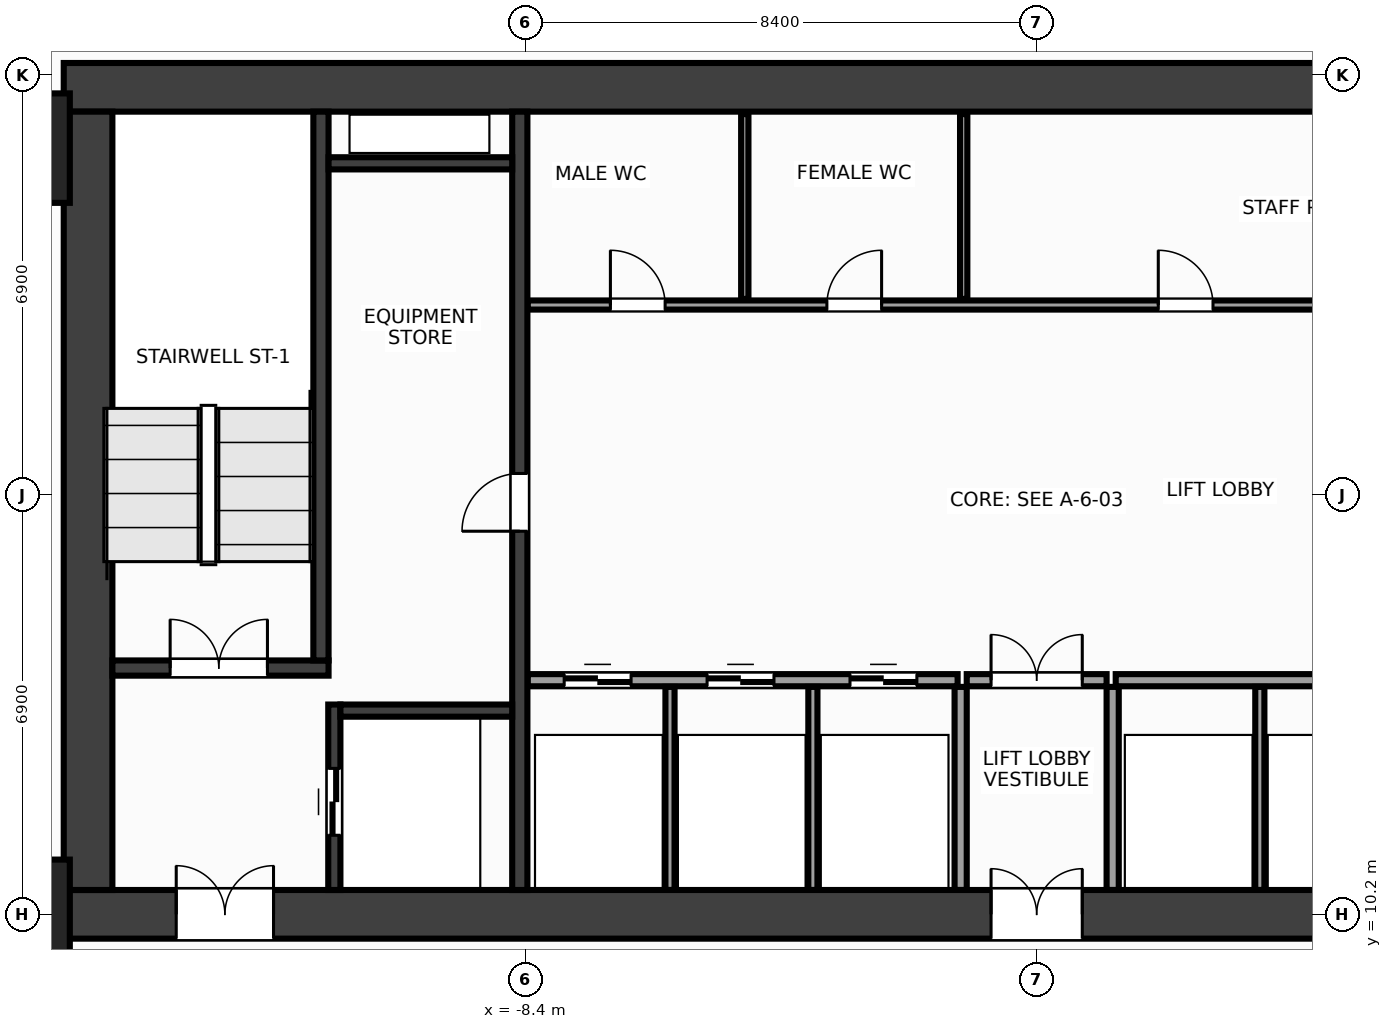
"""IFC4 building model, lengths in metres.
Left out: names, types, materials, properties, quantities, classifications, styles, units other than length and angle.
Written with IfcOpenShell. Run it as: python <this file> out.ifc"""

import sys

from ifc_helpers import new_model, si_unit, direction, frame, frame_2d, origin, origin_2d, place, context, subcontext, project, spatial, rectangle, extrude, source, transform, mapped, element, fill, save


model = new_model("IFC4")
c1 = context("Model", 3, precision=1e-05, world=origin(), true_north=direction((0.0, 1.0)))
c2 = subcontext(c1, "Body", "Model", "MODEL_VIEW")
j1 = project(units=[si_unit("LENGTHUNIT", "METRE"), si_unit("PLANEANGLEUNIT", "RADIAN")], contexts=[c1])
p1 = place(None, origin())
s1 = spatial("IfcSite", under=j1, at=p1, CompositionType="ELEMENT")
p2 = place(p1, origin())
s2 = spatial("IfcBuilding", under=s1, at=p2, CompositionType="ELEMENT")
p3 = place(p2, frame((0.0, 0.0, 23.6)))
s3 = spatial("IfcBuildingStorey", under=s2, at=p3, CompositionType="ELEMENT", Elevation=23.6)
m1 = source(origin(), c2, "Body", "SweptSolid", [
    extrude(rectangle(XDim=32.0, YDim=0.8, at=frame_2d((16.0, 0.0))), origin(), (0.0, 0.0, 1.0), 3.6),
])
p4 = place(p3, frame((-16.0, 23.8, 0.0), z_axis=(0.0, 0.0, 1.0), x_axis=(1.0, 0.0, 0.0)))
e1 = element("IfcWall", 1, at=p4, inside=s3, PredefinedType="SHEAR", context=c2, shape_type="MappedRepresentation", body=[
    mapped(m1, transform((0.0, 0.0, 0.0), x_axis=(1.0, 0.0, 0.0), y_axis=(0.0, 1.0, 0.0), z_axis=(0.0, 0.0, 1.0), scale=1.0)),
])
p5 = place(p3, frame((-16.0, 10.2, 0.0), z_axis=(0.0, 0.0, 1.0), x_axis=(1.0, 0.0, 0.0)))
e2 = element("IfcWall", 2, at=p5, inside=s3, PredefinedType="SHEAR", context=c2, shape_type="MappedRepresentation", body=[
    mapped(m1, transform((0.0, 0.0, 0.0), x_axis=(1.0, 0.0, 0.0), y_axis=(0.0, 1.0, 0.0), z_axis=(0.0, 0.0, 1.0), scale=1.0)),
])
p6 = place(p5, frame((1.85, 0.0, 0.0)))
e3 = element("IfcOpeningElement", 3, at=p6, cuts=e2, PredefinedType="OPENING", context=c2, shape_type="SweptSolid", body=[
    extrude(rectangle(XDim=1.6, YDim=2.15, at=frame_2d((0.8, 1.075))), frame((0.0, 0.412, 0.0), z_axis=(0.0, -1.0, 0.0), x_axis=(1.0, 0.0, 0.0)), (0.0, 0.0, 1.0), 0.824),
])
p7 = place(p5, frame((28.55, 0.0, 0.0)))
e4 = element("IfcOpeningElement", 4, at=p7, cuts=e2, PredefinedType="OPENING", context=c2, shape_type="SweptSolid", body=[
    extrude(rectangle(XDim=1.6, YDim=2.15, at=frame_2d((0.8, 1.075))), frame((0.0, 0.412, 0.0), z_axis=(0.0, -1.0, 0.0), x_axis=(1.0, 0.0, 0.0)), (0.0, 0.0, 1.0), 0.824),
])
p8 = place(p5, frame((15.25, 0.0, 0.0)))
e5 = element("IfcOpeningElement", 5, at=p8, cuts=e2, PredefinedType="OPENING", context=c2, shape_type="SweptSolid", body=[
    extrude(rectangle(XDim=1.5, YDim=2.2, at=frame_2d((0.75, 1.1))), frame((0.0, 0.412, 0.0), z_axis=(0.0, -1.0, 0.0), x_axis=(1.0, 0.0, 0.0)), (0.0, 0.0, 1.0), 0.824),
])
m2 = source(origin(), c2, "Body", "SweptSolid", [
    extrude(rectangle(XDim=12.8, YDim=0.8, at=frame_2d((6.4, 0.0))), origin(), (0.0, 0.0, 1.0), 3.6),
])
p9 = place(p3, frame((-15.6, 10.6, 0.0), z_axis=(0.0, 0.0, 1.0), x_axis=(0.0, 1.0, 0.0)))
e6 = element("IfcWall", 6, at=p9, inside=s3, PredefinedType="SHEAR", context=c2, shape_type="MappedRepresentation", body=[
    mapped(m2, transform((0.0, 0.0, 0.0), x_axis=(1.0, 0.0, 0.0), y_axis=(0.0, 1.0, 0.0), z_axis=(0.0, 0.0, 1.0), scale=1.0)),
])
m3 = source(origin(), c2, "Body", "SweptSolid", [
    extrude(rectangle(XDim=12.8, YDim=0.25, at=frame_2d((6.4, 0.0))), origin(), (0.0, 0.0, 1.0), 3.6),
])
p10 = place(p3, frame((-8.5, 10.6, 0.0), z_axis=(0.0, 0.0, 1.0), x_axis=(0.0, 1.0, 0.0)))
e7 = element("IfcWall", 7, at=p10, inside=s3, PredefinedType="SHEAR", context=c2, shape_type="MappedRepresentation", body=[
    mapped(m3, transform((0.0, 0.0, 0.0), x_axis=(1.0, 0.0, 0.0), y_axis=(0.0, 1.0, 0.0), z_axis=(0.0, 0.0, 1.0), scale=1.0)),
])
p11 = place(p10, frame((5.9, 0.0, 0.0)))
e8 = element("IfcOpeningElement", 8, at=p11, cuts=e7, PredefinedType="OPENING", context=c2, shape_type="SweptSolid", body=[
    extrude(rectangle(XDim=0.95, YDim=2.15, at=frame_2d((0.475, 1.075))), frame((0.0, 0.137, 0.0), z_axis=(0.0, -1.0, 0.0), x_axis=(1.0, 0.0, 0.0)), (0.0, 0.0, 1.0), 0.274),
])
m4 = source(origin(), c2, "Body", "SweptSolid", [
    extrude(rectangle(XDim=3.555, YDim=0.25, at=frame_2d((1.777, 0.0))), origin(), (0.0, 0.0, 1.0), 3.6),
])
p12 = place(p3, frame((-15.2, 14.25, 0.0), z_axis=(0.0, 0.0, 1.0), x_axis=(1.0, 0.0, 0.0)))
e9 = element("IfcWall", 9, at=p12, inside=s3, PredefinedType="SHEAR", context=c2, shape_type="MappedRepresentation", body=[
    mapped(m4, transform((0.0, 0.0, 0.0), x_axis=(1.0, 0.0, 0.0), y_axis=(0.0, 1.0, 0.0), z_axis=(0.0, 0.0, 1.0), scale=1.0)),
])
p13 = place(p12, frame((0.95, 0.0, 0.0)))
e10 = element("IfcOpeningElement", 10, at=p13, cuts=e9, PredefinedType="OPENING", context=c2, shape_type="SweptSolid", body=[
    extrude(rectangle(XDim=1.6, YDim=2.15, at=frame_2d((0.8, 1.075))), frame((0.0, 0.137, 0.0), z_axis=(0.0, -1.0, 0.0), x_axis=(1.0, 0.0, 0.0)), (0.0, 0.0, 1.0), 0.274),
])
m5 = source(origin(), c2, "Body", "SweptSolid", [
    extrude(rectangle(XDim=9.025, YDim=0.25, at=frame_2d((4.512, 0.0))), origin(), (0.0, 0.0, 1.0), 3.6),
])
p14 = place(p3, frame((-11.77, 14.375, 0.0), z_axis=(0.0, 0.0, 1.0), x_axis=(0.0, 1.0, 0.0)))
e11 = element("IfcWall", 11, at=p14, inside=s3, PredefinedType="SHEAR", context=c2, shape_type="MappedRepresentation", body=[
    mapped(m5, transform((0.0, 0.0, 0.0), x_axis=(1.0, 0.0, 0.0), y_axis=(0.0, 1.0, 0.0), z_axis=(0.0, 0.0, 1.0), scale=1.0)),
])
m6 = source(origin(), c2, "Body", "SweptSolid", [
    extrude(rectangle(XDim=3.05, YDim=0.2, at=frame_2d((1.525, 0.0))), origin(), (0.0, 0.0, 1.0), 3.6),
])
p15 = place(p3, frame((-11.55, 10.6, 0.0), z_axis=(0.0, 0.0, 1.0), x_axis=(0.0, 1.0, 0.0)))
e12 = element("IfcWall", 12, at=p15, inside=s3, PredefinedType="SHEAR", context=c2, shape_type="MappedRepresentation", body=[
    mapped(m6, transform((0.0, 0.0, 0.0), x_axis=(1.0, 0.0, 0.0), y_axis=(0.0, 1.0, 0.0), z_axis=(0.0, 0.0, 1.0), scale=1.0)),
])
p16 = place(p15, frame((0.9, 0.0, 0.0)))
e13 = element("IfcOpeningElement", 13, at=p16, cuts=e12, PredefinedType="OPENING", context=c2, shape_type="SweptSolid", body=[
    extrude(rectangle(XDim=1.1, YDim=2.15, at=frame_2d((0.55, 1.075))), frame((0.0, 0.112, 0.0), z_axis=(0.0, -1.0, 0.0), x_axis=(1.0, 0.0, 0.0)), (0.0, 0.0, 1.0), 0.224),
])
m7 = source(origin(), c2, "Body", "SweptSolid", [
    extrude(rectangle(XDim=2.825, YDim=0.2, at=frame_2d((1.413, 0.0))), origin(), (0.0, 0.0, 1.0), 3.6),
])
p17 = place(p3, frame((-11.45, 13.55, 0.0), z_axis=(0.0, 0.0, 1.0), x_axis=(1.0, 0.0, 0.0)))
e14 = element("IfcWall", 14, at=p17, inside=s3, PredefinedType="SHEAR", context=c2, shape_type="MappedRepresentation", body=[
    mapped(m7, transform((0.0, 0.0, 0.0), x_axis=(1.0, 0.0, 0.0), y_axis=(0.0, 1.0, 0.0), z_axis=(0.0, 0.0, 1.0), scale=1.0)),
])
m8 = source(origin(), c2, "Body", "SweptSolid", [
    extrude(rectangle(XDim=3.02, YDim=0.2, at=frame_2d((1.51, 0.0))), origin(), (0.0, 0.0, 1.0), 3.6),
])
p18 = place(p3, frame((-11.645, 22.55, 0.0), z_axis=(0.0, 0.0, 1.0), x_axis=(1.0, 0.0, 0.0)))
e15 = element("IfcWall", 15, at=p18, inside=s3, PredefinedType="SHEAR", context=c2, shape_type="MappedRepresentation", body=[
    mapped(m8, transform((0.0, 0.0, 0.0), x_axis=(1.0, 0.0, 0.0), y_axis=(0.0, 1.0, 0.0), z_axis=(0.0, 0.0, 1.0), scale=1.0)),
])
m9 = source(origin(), c2, "Body", "SweptSolid", [
    extrude(rectangle(XDim=1.8, YDim=1.8, at=origin_2d()), origin(), (0.0, 0.0, 1.0), 3.6),
])
for number, where, z_axis, x_axis in (
    (16, (-16.8, 10.2, 0.0), (0.0, 0.0, 1.0), (1.0, 0.0, 0.0)),
    (17, (-16.8, 22.8, 0.0), (0.0, 0.0, 1.0), (1.0, 0.0, 0.0)),
):
    element("IfcColumn", number, at=place(p3, frame(where, z_axis=z_axis, x_axis=x_axis)), inside=s3, PredefinedType="COLUMN", context=c2, shape_type="MappedRepresentation", body=[
        mapped(m9, transform((0.0, 0.0, 0.0), x_axis=(1.0, 0.0, 0.0), y_axis=(0.0, 1.0, 0.0), z_axis=(0.0, 0.0, 1.0), scale=1.0)),
    ])
m10 = source(origin(), c2, "Body", "SweptSolid", [
    extrude(rectangle(XDim=7.07, YDim=0.2, at=frame_2d((3.535, 0.0))), origin(), (0.0, 0.0, 1.0), 3.36),
])
p19 = place(p3, frame((-8.37, 14.05, 0.0), z_axis=(0.0, 0.0, 1.0), x_axis=(1.0, 0.0, 0.0)))
e18 = element("IfcWall", 18, at=p19, inside=s3, PredefinedType="PARTITIONING", context=c2, shape_type="MappedRepresentation", body=[
    mapped(m10, transform((0.0, 0.0, 0.0), x_axis=(1.0, 0.0, 0.0), y_axis=(0.0, 1.0, 0.0), z_axis=(0.0, 0.0, 1.0), scale=1.0)),
])
p20 = place(p19, frame((0.6, 0.0, 0.0)))
e19 = element("IfcOpeningElement", 19, at=p20, cuts=e18, PredefinedType="OPENING", context=c2, shape_type="SweptSolid", body=[
    extrude(rectangle(XDim=1.1, YDim=2.15, at=frame_2d((0.55, 1.075))), frame((0.0, 0.112, 0.0), z_axis=(0.0, -1.0, 0.0), x_axis=(1.0, 0.0, 0.0)), (0.0, 0.0, 1.0), 0.224),
])
p21 = place(p19, frame((2.95, 0.0, 0.0)))
e20 = element("IfcOpeningElement", 20, at=p21, cuts=e18, PredefinedType="OPENING", context=c2, shape_type="SweptSolid", body=[
    extrude(rectangle(XDim=1.1, YDim=2.15, at=frame_2d((0.55, 1.075))), frame((0.0, 0.112, 0.0), z_axis=(0.0, -1.0, 0.0), x_axis=(1.0, 0.0, 0.0)), (0.0, 0.0, 1.0), 0.224),
])
p22 = place(p19, frame((5.3, 0.0, 0.0)))
e21 = element("IfcOpeningElement", 21, at=p22, cuts=e18, PredefinedType="OPENING", context=c2, shape_type="SweptSolid", body=[
    extrude(rectangle(XDim=1.1, YDim=2.15, at=frame_2d((0.55, 1.075))), frame((0.0, 0.112, 0.0), z_axis=(0.0, -1.0, 0.0), x_axis=(1.0, 0.0, 0.0)), (0.0, 0.0, 1.0), 0.224),
])
p23 = place(p3, frame((1.3, 14.05, 0.0), z_axis=(0.0, 0.0, 1.0), x_axis=(1.0, 0.0, 0.0)))
e22 = element("IfcWall", 22, at=p23, inside=s3, PredefinedType="PARTITIONING", context=c2, shape_type="MappedRepresentation", body=[
    mapped(m10, transform((0.0, 0.0, 0.0), x_axis=(1.0, 0.0, 0.0), y_axis=(0.0, 1.0, 0.0), z_axis=(0.0, 0.0, 1.0), scale=1.0)),
])
m11 = source(origin(), c2, "Body", "SweptSolid", [
    extrude(rectangle(XDim=3.34, YDim=0.2, at=frame_2d((1.67, 0.0))), origin(), (0.0, 0.0, 1.0), 3.36),
])
for number, where, z_axis, x_axis in (
    (23, (-1.25, 10.6, 0.0), (0.0, 0.0, 1.0), (0.0, 1.0, 0.0)),
    (24, (1.25, 10.6, 0.0), (0.0, 0.0, 1.0), (0.0, 1.0, 0.0)),
):
    element("IfcWall", number, at=place(p3, frame(where, z_axis=z_axis, x_axis=x_axis)), inside=s3, PredefinedType="PARTITIONING", context=c2, shape_type="MappedRepresentation", body=[
        mapped(m11, transform((0.0, 0.0, 0.0), x_axis=(1.0, 0.0, 0.0), y_axis=(0.0, 1.0, 0.0), z_axis=(0.0, 0.0, 1.0), scale=1.0)),
    ])
m12 = source(origin(), c2, "Body", "SweptSolid", [
    extrude(rectangle(XDim=2.3, YDim=0.2, at=frame_2d((1.15, 0.0))), origin(), (0.0, 0.0, 1.0), 3.36),
])
p24 = place(p3, frame((-1.15, 14.05, 0.0), z_axis=(0.0, 0.0, 1.0), x_axis=(1.0, 0.0, 0.0)))
e25 = element("IfcWall", 25, at=p24, inside=s3, PredefinedType="PARTITIONING", context=c2, shape_type="MappedRepresentation", body=[
    mapped(m12, transform((0.0, 0.0, 0.0), x_axis=(1.0, 0.0, 0.0), y_axis=(0.0, 1.0, 0.0), z_axis=(0.0, 0.0, 1.0), scale=1.0)),
])
p25 = place(p24, frame((0.4, 0.0, 0.0)))
e26 = element("IfcOpeningElement", 26, at=p25, cuts=e25, PredefinedType="OPENING", context=c2, shape_type="SweptSolid", body=[
    extrude(rectangle(XDim=1.5, YDim=2.2, at=frame_2d((0.75, 1.1))), frame((0.0, 0.112, 0.0), z_axis=(0.0, -1.0, 0.0), x_axis=(1.0, 0.0, 0.0)), (0.0, 0.0, 1.0), 0.224),
])
m13 = source(origin(), c2, "Body", "SweptSolid", [
    extrude(rectangle(XDim=14.59, YDim=0.15, at=frame_2d((7.295, 0.0))), origin(), (0.0, 0.0, 1.0), 3.36),
])
p26 = place(p3, frame((-8.37, 20.22, 0.0), z_axis=(0.0, 0.0, 1.0), x_axis=(1.0, 0.0, 0.0)))
e27 = element("IfcWall", 27, at=p26, inside=s3, PredefinedType="PARTITIONING", context=c2, shape_type="MappedRepresentation", body=[
    mapped(m13, transform((0.0, 0.0, 0.0), x_axis=(1.0, 0.0, 0.0), y_axis=(0.0, 1.0, 0.0), z_axis=(0.0, 0.0, 1.0), scale=1.0)),
])
p27 = place(p26, frame((1.36, 0.0, 0.0)))
e28 = element("IfcOpeningElement", 28, at=p27, cuts=e27, PredefinedType="OPENING", context=c2, shape_type="SweptSolid", body=[
    extrude(rectangle(XDim=0.9, YDim=2.15, at=frame_2d((0.45, 1.075))), frame((0.0, 0.087, 0.0), z_axis=(0.0, -1.0, 0.0), x_axis=(1.0, 0.0, 0.0)), (0.0, 0.0, 1.0), 0.174),
])
p28 = place(p26, frame((4.92, 0.0, 0.0)))
e29 = element("IfcOpeningElement", 29, at=p28, cuts=e27, PredefinedType="OPENING", context=c2, shape_type="SweptSolid", body=[
    extrude(rectangle(XDim=0.9, YDim=2.15, at=frame_2d((0.45, 1.075))), frame((0.0, 0.087, 0.0), z_axis=(0.0, -1.0, 0.0), x_axis=(1.0, 0.0, 0.0)), (0.0, 0.0, 1.0), 0.174),
])
p29 = place(p26, frame((10.37, 0.0, 0.0)))
e30 = element("IfcOpeningElement", 30, at=p29, cuts=e27, PredefinedType="OPENING", context=c2, shape_type="SweptSolid", body=[
    extrude(rectangle(XDim=0.9, YDim=2.15, at=frame_2d((0.45, 1.075))), frame((0.0, 0.087, 0.0), z_axis=(0.0, -1.0, 0.0), x_axis=(1.0, 0.0, 0.0)), (0.0, 0.0, 1.0), 0.174),
])
m14 = source(origin(), c2, "Body", "SweptSolid", [
    extrude(rectangle(XDim=3.34, YDim=0.15, at=frame_2d((1.67, 0.0))), origin(), (0.0, 0.0, 1.0), 3.36),
])
for number, where, z_axis, x_axis in (
    (31, (-6.03, 10.6, 0.0), (0.0, 0.0, 1.0), (0.0, 1.0, 0.0)),
    (32, (-3.68, 10.6, 0.0), (0.0, 0.0, 1.0), (0.0, 1.0, 0.0)),
    (33, (3.67, 10.6, 0.0), (0.0, 0.0, 1.0), (0.0, 1.0, 0.0)),
):
    element("IfcWall", number, at=place(p3, frame(where, z_axis=z_axis, x_axis=x_axis)), inside=s3, PredefinedType="PARTITIONING", context=c2, shape_type="MappedRepresentation", body=[
        mapped(m14, transform((0.0, 0.0, 0.0), x_axis=(1.0, 0.0, 0.0), y_axis=(0.0, 1.0, 0.0), z_axis=(0.0, 0.0, 1.0), scale=1.0)),
    ])
m15 = source(origin(), c2, "Body", "SweptSolid", [
    extrude(rectangle(XDim=3.04, YDim=0.12, at=frame_2d((1.52, 0.0))), origin(), (0.0, 0.0, 1.0), 3.36),
])
for number, where, z_axis, x_axis in (
    (34, (-4.8, 20.32, 0.0), (0.0, 0.0, 1.0), (0.0, 1.0, 0.0)),
    (35, (-1.2, 20.32, 0.0), (0.0, 0.0, 1.0), (0.0, 1.0, 0.0)),
):
    element("IfcWall", number, at=place(p3, frame(where, z_axis=z_axis, x_axis=x_axis)), inside=s3, PredefinedType="PARTITIONING", context=c2, shape_type="MappedRepresentation", body=[
        mapped(m15, transform((0.0, 0.0, 0.0), x_axis=(1.0, 0.0, 0.0), y_axis=(0.0, 1.0, 0.0), z_axis=(0.0, 0.0, 1.0), scale=1.0)),
    ])
m16 = source(origin(), c2, "Body", "SweptSolid", [
    extrude(rectangle(XDim=1.6, YDim=2.15, at=frame_2d((0.8, 1.075))), frame((0.0, 0.025, 0.0), z_axis=(0.0, -1.0, 0.0), x_axis=(1.0, 0.0, 0.0)), (0.0, 0.0, 1.0), 0.05),
])
p30 = place(p13, origin())
e36 = element("IfcDoor", 36, at=p30, inside=s3, OperationType="DOUBLE_DOOR_SINGLE_SWING", PredefinedType="DOOR", context=c2, shape_type="MappedRepresentation", body=[
    mapped(m16, transform((0.0, 0.0, 0.0), x_axis=(1.0, 0.0, 0.0), y_axis=(0.0, 1.0, 0.0), z_axis=(0.0, 0.0, 1.0), scale=1.0)),
])
fill(e10, e36)
p31 = place(p6, origin())
e37 = element("IfcDoor", 37, at=p31, inside=s3, OperationType="DOUBLE_DOOR_SINGLE_SWING", PredefinedType="DOOR", context=c2, shape_type="MappedRepresentation", body=[
    mapped(m16, transform((0.0, 0.0, 0.0), x_axis=(1.0, 0.0, 0.0), y_axis=(0.0, 1.0, 0.0), z_axis=(0.0, 0.0, 1.0), scale=1.0)),
])
fill(e3, e37)
m17 = source(origin(), c2, "Body", "SweptSolid", [
    extrude(rectangle(XDim=1.1, YDim=2.15, at=frame_2d((0.55, 1.075))), frame((0.0, 0.025, 0.0), z_axis=(0.0, -1.0, 0.0), x_axis=(1.0, 0.0, 0.0)), (0.0, 0.0, 1.0), 0.05),
])
p32 = place(p16, origin())
e38 = element("IfcDoor", 38, at=p32, inside=s3, OperationType="DOUBLE_DOOR_SLIDING", PredefinedType="DOOR", context=c2, shape_type="MappedRepresentation", body=[
    mapped(m17, transform((0.0, 0.0, 0.0), x_axis=(1.0, 0.0, 0.0), y_axis=(0.0, 1.0, 0.0), z_axis=(0.0, 0.0, 1.0), scale=1.0)),
])
fill(e13, e38)
m18 = source(origin(), c2, "Body", "SweptSolid", [
    extrude(rectangle(XDim=0.95, YDim=2.15, at=frame_2d((0.475, 1.075))), frame((0.0, 0.025, 0.0), z_axis=(0.0, -1.0, 0.0), x_axis=(1.0, 0.0, 0.0)), (0.0, 0.0, 1.0), 0.05),
])
p33 = place(p11, origin())
e39 = element("IfcDoor", 39, at=p33, inside=s3, OperationType="SINGLE_SWING_LEFT", PredefinedType="DOOR", context=c2, shape_type="MappedRepresentation", body=[
    mapped(m18, transform((0.0, 0.0, 0.0), x_axis=(1.0, 0.0, 0.0), y_axis=(0.0, 1.0, 0.0), z_axis=(0.0, 0.0, 1.0), scale=1.0)),
])
fill(e8, e39)
p34 = place(p20, origin())
e40 = element("IfcDoor", 40, at=p34, inside=s3, OperationType="DOUBLE_DOOR_SLIDING", PredefinedType="DOOR", context=c2, shape_type="MappedRepresentation", body=[
    mapped(m17, transform((0.0, 0.0, 0.0), x_axis=(1.0, 0.0, 0.0), y_axis=(0.0, 1.0, 0.0), z_axis=(0.0, 0.0, 1.0), scale=1.0)),
])
fill(e19, e40)
p35 = place(p21, origin())
e41 = element("IfcDoor", 41, at=p35, inside=s3, OperationType="DOUBLE_DOOR_SLIDING", PredefinedType="DOOR", context=c2, shape_type="MappedRepresentation", body=[
    mapped(m17, transform((0.0, 0.0, 0.0), x_axis=(1.0, 0.0, 0.0), y_axis=(0.0, 1.0, 0.0), z_axis=(0.0, 0.0, 1.0), scale=1.0)),
])
fill(e20, e41)
p36 = place(p22, origin())
e42 = element("IfcDoor", 42, at=p36, inside=s3, OperationType="DOUBLE_DOOR_SLIDING", PredefinedType="DOOR", context=c2, shape_type="MappedRepresentation", body=[
    mapped(m17, transform((0.0, 0.0, 0.0), x_axis=(1.0, 0.0, 0.0), y_axis=(0.0, 1.0, 0.0), z_axis=(0.0, 0.0, 1.0), scale=1.0)),
])
fill(e21, e42)
m19 = source(origin(), c2, "Body", "SweptSolid", [
    extrude(rectangle(XDim=1.5, YDim=2.2, at=frame_2d((0.75, 1.1))), frame((0.0, 0.025, 0.0), z_axis=(0.0, -1.0, 0.0), x_axis=(1.0, 0.0, 0.0)), (0.0, 0.0, 1.0), 0.05),
])
p37 = place(p25, origin())
e43 = element("IfcDoor", 43, at=p37, inside=s3, OperationType="DOUBLE_DOOR_SINGLE_SWING", PredefinedType="DOOR", context=c2, shape_type="MappedRepresentation", body=[
    mapped(m19, transform((0.0, 0.0, 0.0), x_axis=(1.0, 0.0, 0.0), y_axis=(0.0, 1.0, 0.0), z_axis=(0.0, 0.0, 1.0), scale=1.0)),
])
fill(e26, e43)
p38 = place(p8, origin())
e44 = element("IfcDoor", 44, at=p38, inside=s3, OperationType="DOUBLE_DOOR_SINGLE_SWING", PredefinedType="DOOR", context=c2, shape_type="MappedRepresentation", body=[
    mapped(m19, transform((0.0, 0.0, 0.0), x_axis=(1.0, 0.0, 0.0), y_axis=(0.0, 1.0, 0.0), z_axis=(0.0, 0.0, 1.0), scale=1.0)),
])
fill(e5, e44)
m20 = source(origin(), c2, "Body", "SweptSolid", [
    extrude(rectangle(XDim=0.9, YDim=2.15, at=frame_2d((0.45, 1.075))), frame((0.0, 0.025, 0.0), z_axis=(0.0, -1.0, 0.0), x_axis=(1.0, 0.0, 0.0)), (0.0, 0.0, 1.0), 0.05),
])
p39 = place(p27, origin())
e45 = element("IfcDoor", 45, at=p39, inside=s3, OperationType="SINGLE_SWING_LEFT", PredefinedType="DOOR", context=c2, shape_type="MappedRepresentation", body=[
    mapped(m20, transform((0.0, 0.0, 0.0), x_axis=(1.0, 0.0, 0.0), y_axis=(0.0, 1.0, 0.0), z_axis=(0.0, 0.0, 1.0), scale=1.0)),
])
fill(e28, e45)
p40 = place(p28, origin())
e46 = element("IfcDoor", 46, at=p40, inside=s3, OperationType="SINGLE_SWING_RIGHT", PredefinedType="DOOR", context=c2, shape_type="MappedRepresentation", body=[
    mapped(m20, transform((0.0, 0.0, 0.0), x_axis=(1.0, 0.0, 0.0), y_axis=(0.0, 1.0, 0.0), z_axis=(0.0, 0.0, 1.0), scale=1.0)),
])
fill(e29, e46)
p41 = place(p29, origin())
e47 = element("IfcDoor", 47, at=p41, inside=s3, OperationType="SINGLE_SWING_LEFT", PredefinedType="DOOR", context=c2, shape_type="MappedRepresentation", body=[
    mapped(m20, transform((0.0, 0.0, 0.0), x_axis=(1.0, 0.0, 0.0), y_axis=(0.0, 1.0, 0.0), z_axis=(0.0, 0.0, 1.0), scale=1.0)),
])
fill(e30, e47)
save(model, sys.argv[1])
